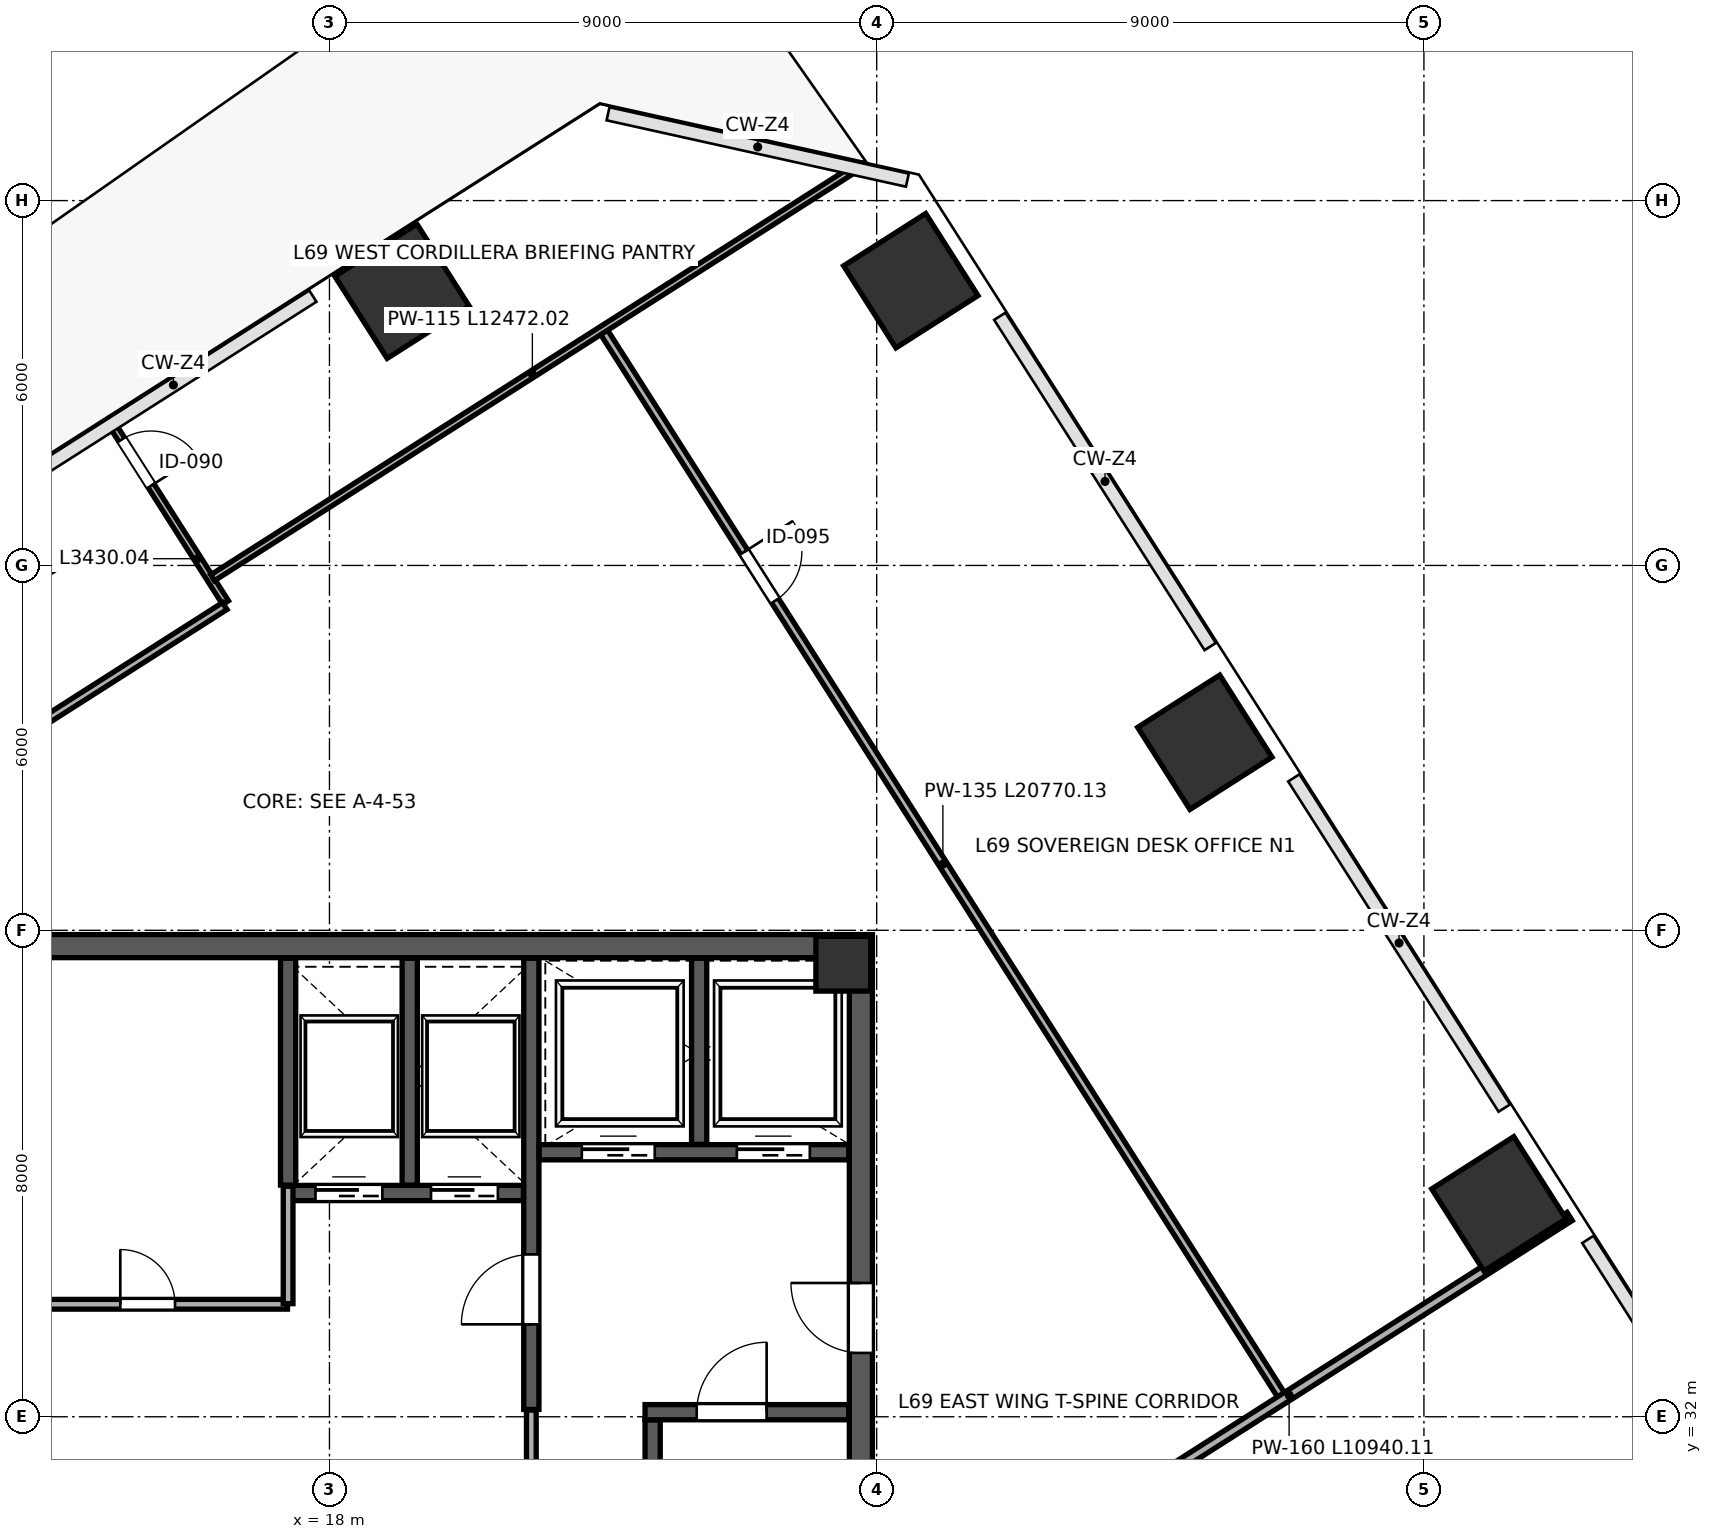
"""IFC4 building model, lengths in metres.
Left out: names, types, materials, properties, quantities, classifications, styles, units other than length and angle.
Written with IfcOpenShell. Run it as: python <this file> out.ifc"""

import sys

from ifc_helpers import new_model, si_unit, direction, frame, frame_2d, origin, origin_2d, place, context, subcontext, project, spatial, rectangle, extrude, source, transform, mapped, element, fill, save


model = new_model("IFC4")
c1 = context("Model", 3, precision=1e-05, world=origin(), true_north=direction((0.0, 1.0)))
c2 = subcontext(c1, "Body", "Model", "MODEL_VIEW")
j1 = project(units=[si_unit("LENGTHUNIT", "METRE"), si_unit("PLANEANGLEUNIT", "RADIAN")], contexts=[c1])
p1 = place(None, origin())
s1 = spatial("IfcSite", under=j1, at=p1, CompositionType="ELEMENT")
p2 = place(p1, origin())
s2 = spatial("IfcBuilding", under=s1, at=p2, CompositionType="ELEMENT")
p3 = place(p2, frame((0.0, 0.0, 307.2)))
s3 = spatial("IfcBuildingStorey", under=s2, at=p3, CompositionType="ELEMENT", Elevation=307.2)
m1 = source(origin(), c2, "Body", "SweptSolid", [
    extrude(rectangle(XDim=0.9, YDim=0.9, at=origin_2d()), origin(), (0.0, 0.0, 1.0), 4.198),
])
p4 = place(p3, frame((26.45, 39.45, 0.001), z_axis=(0.0, 0.0, 1.0), x_axis=(1.0, 0.0, 0.0)))
e1 = element("IfcColumn", 1, at=p4, inside=s3, PredefinedType="COLUMN", context=c2, shape_type="MappedRepresentation", body=[
    mapped(m1, transform((0.0, 0.0, 0.0), scale=1.0)),
])
m2 = source(origin(), c2, "Body", "SweptSolid", [
    extrude(rectangle(XDim=1.6, YDim=1.6, at=origin_2d()), origin(), (0.0, 0.0, 1.0), 4.198),
])
for number, where, z_axis, x_axis in (
    (2, (27.561, 50.683, 0.001), (0.0, 0.0, 1.0), (-0.537, 0.843, 0.0)),
    (3, (32.397, 43.092, 0.001), (0.0, 0.0, 1.0), (-0.537, 0.843, 0.0)),
    (4, (37.232, 35.501, 0.001), (0.0, 0.0, 1.0), (-0.537, 0.843, 0.0)),
    (5, (12.447, 46.211, 0.001), (0.0, 0.0, 1.0), (-0.537, 0.843, 0.0)),
    (6, (19.194, 50.51, 0.001), (0.0, 0.0, 1.0), (-0.537, 0.843, 0.0)),
):
    element("IfcColumn", number, at=place(p3, frame(where, z_axis=z_axis, x_axis=x_axis)), inside=s3, PredefinedType="COLUMN", context=c2, shape_type="MappedRepresentation", body=[
        mapped(m2, transform((0.0, 0.0, 0.0), scale=1.0)),
    ])
p5 = place(p3, frame((26.74, 24.45, 0.0), z_axis=(0.0, 0.0, 1.0), x_axis=(0.0, 1.0, 0.0)))
e7 = element("IfcWall", 7, at=p5, inside=s3, PredefinedType="SHEAR", context=c2, shape_type="SweptSolid", body=[
    extrude(rectangle(XDim=15.1, YDim=0.38, at=frame_2d((7.55, 0.0))), origin(), (0.0, 0.0, 1.0), 3.96),
])
p6 = place(p5, frame((8.6, 0.0, 0.0)))
e8 = element("IfcOpeningElement", 8, at=p6, cuts=e7, PredefinedType="OPENING", context=c2, shape_type="SweptSolid", body=[
    extrude(rectangle(XDim=1.15, YDim=2.2, at=frame_2d((0.575, 1.1))), frame((0.0, 0.2, 0.0), z_axis=(0.0, -1.0, 0.0), x_axis=(1.0, 0.0, 0.0)), (0.0, 0.0, 1.0), 0.4),
])
p7 = place(p3, frame((9.07, 39.74, 0.0), z_axis=(0.0, 0.0, 1.0), x_axis=(1.0, 0.0, 0.0)))
e9 = element("IfcWall", 9, at=p7, inside=s3, PredefinedType="SHEAR", context=c2, shape_type="SweptSolid", body=[
    extrude(rectangle(XDim=17.86, YDim=0.38, at=frame_2d((8.93, 0.0))), origin(), (0.0, 0.0, 1.0), 3.96),
])
p8 = place(p3, frame((23.315, 24.46, 0.0), z_axis=(0.0, 0.0, 1.0), x_axis=(0.0, 1.0, 0.0)))
e10 = element("IfcWall", 10, at=p8, inside=s3, PredefinedType="SHEAR", context=c2, shape_type="SweptSolid", body=[
    extrude(rectangle(XDim=7.49, YDim=0.25, at=frame_2d((3.745, 0.0))), origin(), (0.0, 0.0, 1.0), 3.96),
])
p9 = place(p3, frame((23.19, 32.075, 0.0), z_axis=(0.0, 0.0, 1.0), x_axis=(1.0, 0.0, 0.0)))
e11 = element("IfcWall", 11, at=p9, inside=s3, PredefinedType="SHEAR", context=c2, shape_type="SweptSolid", body=[
    extrude(rectangle(XDim=3.35, YDim=0.25, at=frame_2d((1.675, 0.0))), origin(), (0.0, 0.0, 1.0), 3.96),
])
p10 = place(p9, frame((0.85, 0.0, 0.0)))
e12 = element("IfcOpeningElement", 12, at=p10, cuts=e11, PredefinedType="OPENING", context=c2, shape_type="SweptSolid", body=[
    extrude(rectangle(XDim=1.15, YDim=2.2, at=frame_2d((0.575, 1.1))), frame((0.0, 0.135, 0.0), z_axis=(0.0, -1.0, 0.0), x_axis=(1.0, 0.0, 0.0)), (0.0, 0.0, 1.0), 0.27),
])
p11 = place(p3, frame((21.32, 32.12, 0.0), z_axis=(0.0, 0.0, 1.0), x_axis=(0.0, 1.0, 0.0)))
e13 = element("IfcWall", 13, at=p11, inside=s3, PredefinedType="SHEAR", context=c2, shape_type="SweptSolid", body=[
    extrude(rectangle(XDim=7.42, YDim=0.25, at=frame_2d((3.71, 0.0))), origin(), (0.0, 0.0, 1.0), 3.96),
])
p12 = place(p11, frame((1.4, 0.0, 0.0)))
e14 = element("IfcOpeningElement", 14, at=p12, cuts=e13, PredefinedType="OPENING", context=c2, shape_type="SweptSolid", body=[
    extrude(rectangle(XDim=1.15, YDim=2.2, at=frame_2d((0.575, 1.1))), frame((0.0, 0.135, 0.0), z_axis=(0.0, -1.0, 0.0), x_axis=(1.0, 0.0, 0.0)), (0.0, 0.0, 1.0), 0.27),
])
p13 = place(p3, frame((21.45, 36.35, 0.0), z_axis=(0.0, 0.0, 1.0), x_axis=(1.0, 0.0, 0.0)))
e15 = element("IfcWall", 15, at=p13, inside=s3, PredefinedType="SHEAR", context=c2, shape_type="SweptSolid", body=[
    extrude(rectangle(XDim=5.09, YDim=0.25, at=frame_2d((2.545, 0.0))), origin(), (0.0, 0.0, 1.0), 3.96),
])
p14 = place(p13, frame((0.7, 0.0, 0.0)))
e16 = element("IfcOpeningElement", 16, at=p14, cuts=e15, PredefinedType="OPENING", context=c2, shape_type="SweptSolid", body=[
    extrude(rectangle(XDim=1.2, YDim=2.2, at=frame_2d((0.6, 1.1))), frame((0.0, 0.135, 0.0), z_axis=(0.0, -1.0, 0.0), x_axis=(1.0, 0.0, 0.0)), (0.0, 0.0, 1.0), 0.27),
])
p15 = place(p13, frame((3.25, 0.0, 0.0)))
e17 = element("IfcOpeningElement", 17, at=p15, cuts=e15, PredefinedType="OPENING", context=c2, shape_type="SweptSolid", body=[
    extrude(rectangle(XDim=1.2, YDim=2.2, at=frame_2d((0.6, 1.1))), frame((0.0, 0.135, 0.0), z_axis=(0.0, -1.0, 0.0), x_axis=(1.0, 0.0, 0.0)), (0.0, 0.0, 1.0), 0.27),
])
p16 = place(p3, frame((24.08, 36.48, 0.0), z_axis=(0.0, 0.0, 1.0), x_axis=(0.0, 1.0, 0.0)))
e18 = element("IfcWall", 18, at=p16, inside=s3, PredefinedType="SHEAR", context=c2, shape_type="SweptSolid", body=[
    extrude(rectangle(XDim=3.06, YDim=0.25, at=frame_2d((1.53, 0.0))), origin(), (0.0, 0.0, 1.0), 3.96),
])
p17 = place(p3, frame((17.32, 35.68, 0.0), z_axis=(0.0, 0.0, 1.0), x_axis=(1.0, 0.0, 0.0)))
e19 = element("IfcWall", 19, at=p17, inside=s3, PredefinedType="SHEAR", context=c2, shape_type="SweptSolid", body=[
    extrude(rectangle(XDim=3.87, YDim=0.25, at=frame_2d((1.935, 0.0))), origin(), (0.0, 0.0, 1.0), 3.96),
])
p18 = place(p17, frame((0.45, 0.0, 0.0)))
e20 = element("IfcOpeningElement", 20, at=p18, cuts=e19, PredefinedType="OPENING", context=c2, shape_type="SweptSolid", body=[
    extrude(rectangle(XDim=1.1, YDim=2.2, at=frame_2d((0.55, 1.1))), frame((0.0, 0.135, 0.0), z_axis=(0.0, -1.0, 0.0), x_axis=(1.0, 0.0, 0.0)), (0.0, 0.0, 1.0), 0.27),
])
p19 = place(p17, frame((2.35, 0.0, 0.0)))
e21 = element("IfcOpeningElement", 21, at=p19, cuts=e19, PredefinedType="OPENING", context=c2, shape_type="SweptSolid", body=[
    extrude(rectangle(XDim=1.1, YDim=2.2, at=frame_2d((0.55, 1.1))), frame((0.0, 0.135, 0.0), z_axis=(0.0, -1.0, 0.0), x_axis=(1.0, 0.0, 0.0)), (0.0, 0.0, 1.0), 0.27),
])
for number, where, z_axis, x_axis in (
    (22, (17.32, 35.81, 0.0), (0.0, 0.0, 1.0), (0.0, 1.0, 0.0)),
    (23, (19.32, 35.81, 0.0), (0.0, 0.0, 1.0), (0.0, 1.0, 0.0)),
):
    element("IfcWall", number, at=place(p3, frame(where, z_axis=z_axis, x_axis=x_axis)), inside=s3, PredefinedType="SHEAR", context=c2, shape_type="SweptSolid", body=[
        extrude(rectangle(XDim=3.73, YDim=0.25, at=frame_2d((1.865, 0.0))), origin(), (0.0, 0.0, 1.0), 3.96),
    ])
p20 = place(p3, frame((13.21, 33.85, 0.0), z_axis=(0.0, 0.0, 1.0), x_axis=(1.0, 0.0, 0.0)))
e24 = element("IfcWall", 24, at=p20, inside=s3, PredefinedType="PARTITIONING", context=c2, shape_type="SweptSolid", body=[
    extrude(rectangle(XDim=4.1, YDim=0.16, at=frame_2d((2.05, 0.0))), origin(), (0.0, 0.0, 1.0), 3.96),
])
p21 = place(p20, frame((1.35, 0.0, 0.0)))
e25 = element("IfcOpeningElement", 25, at=p21, cuts=e24, PredefinedType="OPENING", context=c2, shape_type="SweptSolid", body=[
    extrude(rectangle(XDim=0.9, YDim=2.15, at=frame_2d((0.45, 1.075))), frame((0.0, 0.09, 0.0), z_axis=(0.0, -1.0, 0.0), x_axis=(1.0, 0.0, 0.0)), (0.0, 0.0, 1.0), 0.18),
])
p22 = place(p3, frame((17.32, 33.86, 0.0), z_axis=(0.0, 0.0, 1.0), x_axis=(0.0, 1.0, 0.0)))
e26 = element("IfcWall", 26, at=p22, inside=s3, PredefinedType="PARTITIONING", context=c2, shape_type="SweptSolid", body=[
    extrude(rectangle(XDim=1.93, YDim=0.16, at=frame_2d((0.965, 0.0))), origin(), (0.0, 0.0, 1.0), 3.96),
])
p23 = place(p3, frame((21.32, 29.19, 0.0), z_axis=(0.0, 0.0, 1.0), x_axis=(0.0, 1.0, 0.0)))
e27 = element("IfcWall", 27, at=p23, inside=s3, PredefinedType="PARTITIONING", context=c2, shape_type="SweptSolid", body=[
    extrude(rectangle(XDim=2.92, YDim=0.16, at=frame_2d((1.46, 0.0))), origin(), (0.0, 0.0, 1.0), 3.96),
])
p24 = place(p3, frame((22.509, 49.847, 0.0), z_axis=(0.0, 0.0, 1.0), x_axis=(0.537290700932, -0.843397120396, 0.0)))
e28 = element("IfcWall", 28, at=p24, inside=s3, PredefinedType="PARTITIONING", context=c2, shape_type="SweptSolid", body=[
    extrude(rectangle(XDim=20.77, YDim=0.135, at=frame_2d((10.385, 0.0))), origin(), (0.0, 0.0, 1.0), 3.96),
])
p25 = place(p24, frame((4.3, 0.0, 0.0)))
e29 = element("IfcOpeningElement", 29, at=p25, cuts=e28, PredefinedType="OPENING", context=c2, shape_type="SweptSolid", body=[
    extrude(rectangle(XDim=0.95, YDim=2.15, at=frame_2d((0.475, 1.075))), frame((0.0, 0.078, 0.0), z_axis=(0.0, -1.0, 0.0), x_axis=(1.0, 0.0, 0.0)), (0.0, 0.0, 1.0), 0.155),
])
p26 = place(p3, frame((14.448, 48.281, 0.0), z_axis=(0.0, 0.0, 1.0), x_axis=(0.537285301829, -0.843400559899, 0.0)))
e30 = element("IfcWall", 30, at=p26, inside=s3, PredefinedType="PARTITIONING", context=c2, shape_type="SweptSolid", body=[
    extrude(rectangle(XDim=3.43, YDim=0.115, at=frame_2d((1.715, 0.0))), origin(), (0.0, 0.0, 1.0), 3.295),
])
p27 = place(p26, frame((0.25, 0.0, 0.0)))
e31 = element("IfcOpeningElement", 31, at=p27, cuts=e30, PredefinedType="OPENING", context=c2, shape_type="SweptSolid", body=[
    extrude(rectangle(XDim=0.9, YDim=2.15, at=frame_2d((0.45, 1.075))), frame((0.0, 0.067, 0.0), z_axis=(0.0, -1.0, 0.0), x_axis=(1.0, 0.0, 0.0)), (0.0, 0.0, 1.0), 0.135),
])
p28 = place(p3, frame((1.798, 36.107, 0.0), z_axis=(0.0, 0.0, 1.0), x_axis=(0.843396745572, 0.537291289301, 0.0)))
e32 = element("IfcWall", 32, at=p28, inside=s3, PredefinedType="PARTITIONING", context=c2, shape_type="SweptSolid", body=[
    extrude(rectangle(XDim=17.17, YDim=0.135, at=frame_2d((8.585, 0.0))), origin(), (0.0, 0.0, 1.0), 3.96),
])
p29 = place(p3, frame((16.077, 45.797, 0.0), z_axis=(0.0, 0.0, 1.0), x_axis=(0.843392973199, 0.537297210824, 0.0)))
e33 = element("IfcWall", 33, at=p29, inside=s3, PredefinedType="PARTITIONING", context=c2, shape_type="SweptSolid", body=[
    extrude(rectangle(XDim=12.472, YDim=0.115, at=frame_2d((6.236, 0.0))), origin(), (0.0, 0.0, 1.0), 3.96),
])
p30 = place(p3, frame((29.169, 29.416, 0.0), z_axis=(0.0, 0.0, 1.0), x_axis=(0.843389386546, 0.537302840734, 0.0)))
e34 = element("IfcWall", 34, at=p30, inside=s3, PredefinedType="PARTITIONING", context=c2, shape_type="SweptSolid", body=[
    extrude(rectangle(XDim=10.94, YDim=0.16, at=frame_2d((5.47, 0.0))), origin(), (0.0, 0.0, 1.0), 3.96),
])
m3 = source(origin(), c2, "Body", "SweptSolid", [
    extrude(rectangle(XDim=1.15, YDim=2.2, at=frame_2d((0.575, 1.1))), frame((0.0, 0.025, 0.0), z_axis=(0.0, -1.0, 0.0), x_axis=(1.0, 0.0, 0.0)), (0.0, 0.0, 1.0), 0.05),
])
p31 = place(p12, origin())
e35 = element("IfcDoor", 35, at=p31, inside=s3, OperationType="SINGLE_SWING_LEFT", PredefinedType="DOOR", context=c2, shape_type="MappedRepresentation", body=[
    mapped(m3, transform((0.0, 0.0, 0.0), scale=1.0)),
])
fill(e14, e35)
m4 = source(origin(), c2, "Body", "SweptSolid", [
    extrude(rectangle(XDim=1.15, YDim=2.2, at=frame_2d((0.575, 1.1))), frame((0.0, 0.025, 0.0), z_axis=(0.0, -1.0, 0.0), x_axis=(1.0, 0.0, 0.0)), (0.0, 0.0, 1.0), 0.05),
])
p32 = place(p10, origin())
e36 = element("IfcDoor", 36, at=p32, inside=s3, OperationType="SINGLE_SWING_RIGHT", PredefinedType="DOOR", context=c2, shape_type="MappedRepresentation", body=[
    mapped(m4, transform((0.0, 0.0, 0.0), scale=1.0)),
])
fill(e12, e36)
p33 = place(p6, origin())
e37 = element("IfcDoor", 37, at=p33, inside=s3, OperationType="SINGLE_SWING_RIGHT", PredefinedType="DOOR", context=c2, shape_type="MappedRepresentation", body=[
    mapped(m3, transform((0.0, 0.0, 0.0), scale=1.0)),
])
fill(e8, e37)
m5 = source(origin(), c2, "Body", "SweptSolid", [
    extrude(rectangle(XDim=1.1, YDim=2.2, at=frame_2d((0.55, 1.1))), frame((0.0, 0.025, 0.0), z_axis=(0.0, -1.0, 0.0), x_axis=(1.0, 0.0, 0.0)), (0.0, 0.0, 1.0), 0.05),
])
p34 = place(p18, origin())
e38 = element("IfcDoor", 38, at=p34, inside=s3, OperationType="SLIDING_TO_LEFT", PredefinedType="DOOR", context=c2, shape_type="MappedRepresentation", body=[
    mapped(m5, transform((0.0, 0.0, 0.0), scale=1.0)),
])
fill(e20, e38)
p35 = place(p19, origin())
e39 = element("IfcDoor", 39, at=p35, inside=s3, OperationType="SLIDING_TO_RIGHT", PredefinedType="DOOR", context=c2, shape_type="MappedRepresentation", body=[
    mapped(m5, transform((0.0, 0.0, 0.0), scale=1.0)),
])
fill(e21, e39)
m6 = source(origin(), c2, "Body", "SweptSolid", [
    extrude(rectangle(XDim=1.2, YDim=2.2, at=frame_2d((0.6, 1.1))), frame((0.0, 0.025, 0.0), z_axis=(0.0, -1.0, 0.0), x_axis=(1.0, 0.0, 0.0)), (0.0, 0.0, 1.0), 0.05),
])
p36 = place(p14, origin())
e40 = element("IfcDoor", 40, at=p36, inside=s3, OperationType="SLIDING_TO_LEFT", PredefinedType="DOOR", context=c2, shape_type="MappedRepresentation", body=[
    mapped(m6, transform((0.0, 0.0, 0.0), scale=1.0)),
])
fill(e16, e40)
p37 = place(p15, origin())
e41 = element("IfcDoor", 41, at=p37, inside=s3, OperationType="SLIDING_TO_RIGHT", PredefinedType="DOOR", context=c2, shape_type="MappedRepresentation", body=[
    mapped(m6, transform((0.0, 0.0, 0.0), scale=1.0)),
])
fill(e17, e41)
m7 = source(origin(), c2, "Body", "SweptSolid", [
    extrude(rectangle(XDim=0.9, YDim=2.15, at=frame_2d((0.45, 1.075))), frame((0.0, 0.025, 0.0), z_axis=(0.0, -1.0, 0.0), x_axis=(1.0, 0.0, 0.0)), (0.0, 0.0, 1.0), 0.05),
])
p38 = place(p21, origin())
e42 = element("IfcDoor", 42, at=p38, inside=s3, OperationType="SINGLE_SWING_LEFT", PredefinedType="DOOR", context=c2, shape_type="MappedRepresentation", body=[
    mapped(m7, transform((0.0, 0.0, 0.0), scale=1.0)),
])
fill(e25, e42)
m8 = source(origin(), c2, "Body", "SweptSolid", [
    extrude(rectangle(XDim=0.95, YDim=2.15, at=frame_2d((0.475, 1.075))), frame((0.0, 0.025, 0.0), z_axis=(0.0, -1.0, 0.0), x_axis=(1.0, 0.0, 0.0)), (0.0, 0.0, 1.0), 0.05),
])
p39 = place(p25, origin())
e43 = element("IfcDoor", 43, at=p39, inside=s3, OperationType="SINGLE_SWING_LEFT", PredefinedType="DOOR", context=c2, shape_type="MappedRepresentation", body=[
    mapped(m8, transform((0.0, 0.0, 0.0), scale=1.0)),
])
fill(e29, e43)
m9 = source(origin(), c2, "Body", "SweptSolid", [
    extrude(rectangle(XDim=0.9, YDim=2.15, at=frame_2d((0.45, 1.075))), frame((0.0, 0.025, 0.0), z_axis=(0.0, -1.0, 0.0), x_axis=(1.0, 0.0, 0.0)), (0.0, 0.0, 1.0), 0.05),
])
p40 = place(p27, origin())
e44 = element("IfcDoor", 44, at=p40, inside=s3, OperationType="SINGLE_SWING_RIGHT", PredefinedType="DOOR", context=c2, shape_type="MappedRepresentation", body=[
    mapped(m9, transform((0.0, 0.0, 0.0), scale=1.0)),
])
fill(e31, e44)
save(model, sys.argv[1])
